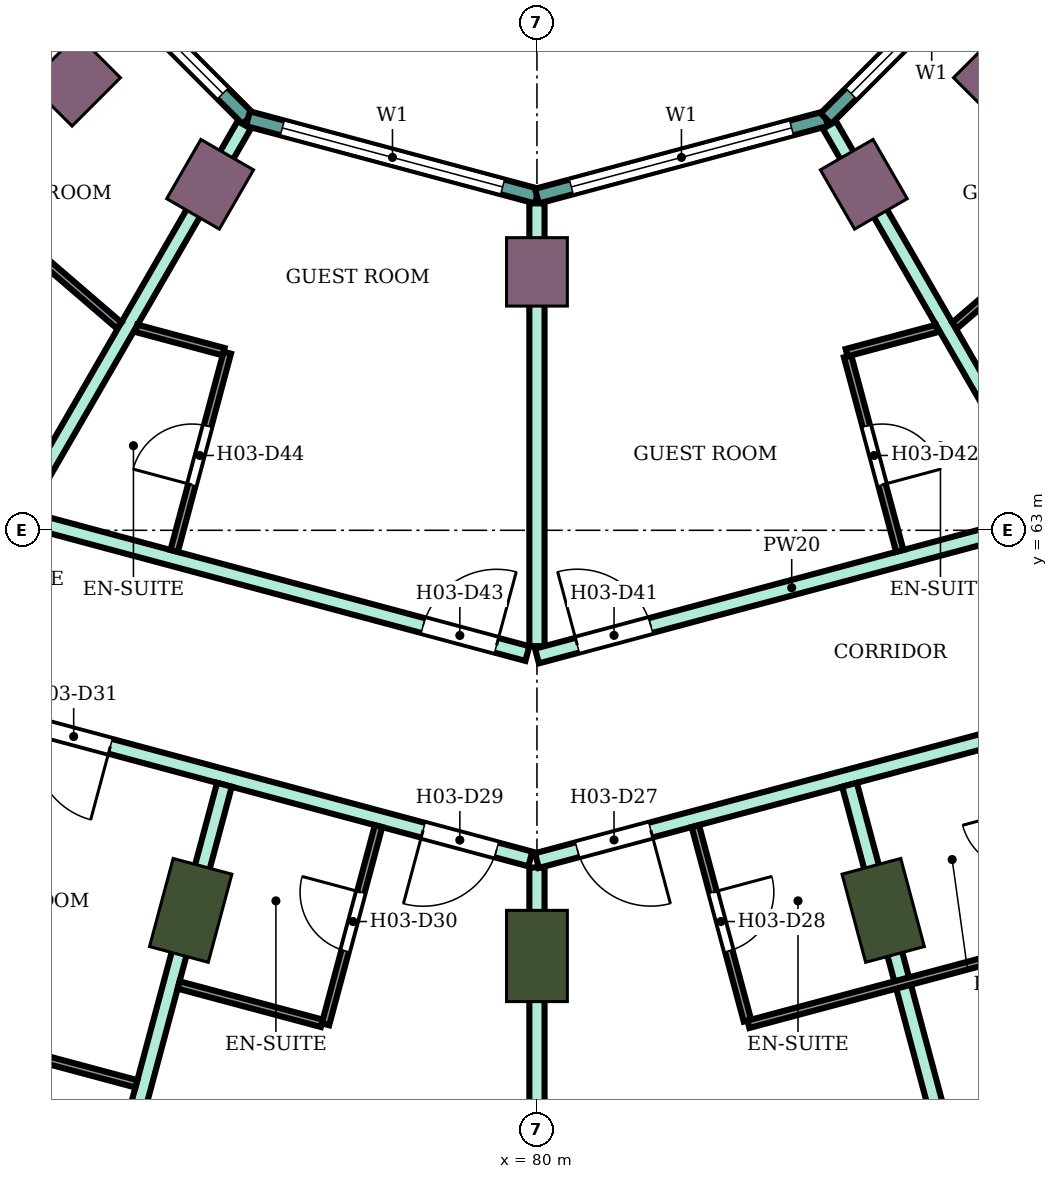
"""IFC4 building model, lengths in metres.
Left out: names, types, materials, properties, quantities, classifications, styles, units other than length and angle.
Written with IfcOpenShell. Run it as: python <this file> out.ifc"""

import sys

from ifc_helpers import new_model, si_unit, direction, frame, frame_2d, origin, origin_2d, place, context, subcontext, project, spatial, rectangle, extrude, element, fill, save


model = new_model("IFC4")
c1 = context("Model", 3, precision=1e-05, world=origin(), true_north=direction((0.0, 1.0)))
c2 = subcontext(c1, "Body", "Model", "MODEL_VIEW")
j1 = project(units=[si_unit("LENGTHUNIT", "METRE"), si_unit("PLANEANGLEUNIT", "RADIAN")], contexts=[c1])
p1 = place(None, origin())
s1 = spatial("IfcSite", under=j1, at=p1, CompositionType="ELEMENT")
p2 = place(p1, origin())
s2 = spatial("IfcBuilding", under=s1, at=p2, CompositionType="ELEMENT")
p3 = place(p2, frame((0.0, 0.0, 59.2)))
s3 = spatial("IfcBuildingStorey", under=s2, at=p3, CompositionType="ELEMENT", Elevation=59.2)
for number, where, z_axis, x_axis in (
    (1, (75.445, 58.0, 0.0), (0.0, 0.0, 1.0), (-0.259, -0.966, 0.0)),
    (2, (80.0, 57.4, 0.0), (0.0, 0.0, 1.0), (0.0, -1.0, 0.0)),
    (3, (84.555, 58.0, 0.0), (0.0, 0.0, 1.0), (0.259, -0.966, 0.0)),
):
    element("IfcColumn", number, at=place(p3, frame(where, z_axis=z_axis, x_axis=x_axis)), inside=s3, PredefinedType="COLUMN", context=c2, shape_type="SweptSolid", body=[
        extrude(rectangle(XDim=1.2, YDim=0.8, at=origin_2d()), origin(), (0.0, 0.0, 1.0), 3.8),
    ])
for number, where, z_axis, x_axis in (
    (4, (73.919, 68.919, 0.0), (0.0, 0.0, 1.0), (-0.707, -0.707, 0.0)),
    (5, (75.7, 67.552, 0.0), (0.0, 0.0, 1.0), (-0.5, -0.866, 0.0)),
    (6, (80.0, 66.4, 0.0), (0.0, 0.0, 1.0), (0.0, -1.0, 0.0)),
    (7, (84.3, 67.552, 0.0), (0.0, 0.0, 1.0), (0.5, -0.866, 0.0)),
    (8, (86.081, 68.919, 0.0), (0.0, 0.0, 1.0), (0.707, -0.707, 0.0)),
):
    element("IfcColumn", number, at=place(p3, frame(where, z_axis=z_axis, x_axis=x_axis)), inside=s3, PredefinedType="COLUMN", context=c2, shape_type="SweptSolid", body=[
        extrude(rectangle(XDim=0.9, YDim=0.8, at=origin_2d()), origin(), (0.0, 0.0, 1.0), 3.8),
    ])
p4 = place(p3, frame((73.415, 71.198, 0.0), z_axis=(0.0, 0.0, 1.0), x_axis=(0.707106781187, -0.707106781187, 0.0)))
e9 = element("IfcWall", 9, at=p4, inside=s3, PredefinedType="NOTDEFINED", context=c2, shape_type="SweptSolid", body=[
    extrude(rectangle(XDim=3.936, YDim=0.2, at=frame_2d((1.968, 0.0))), origin(), (0.0, 0.0, 1.0), 3.8),
])
p5 = place(p4, frame((0.468, 0.0, 0.9)))
e10 = element("IfcOpeningElement", 10, at=p5, cuts=e9, PredefinedType="OPENING", context=c2, shape_type="SweptSolid", body=[
    extrude(rectangle(XDim=3.0, YDim=2.3, at=frame_2d((1.5, 1.15))), frame((0.0, 0.11, 0.0), z_axis=(0.0, -1.0, 0.0), x_axis=(1.0, 0.0, 0.0)), (0.0, 0.0, 1.0), 0.22),
])
p6 = place(p3, frame((76.198, 68.415, 0.0), z_axis=(0.0, 0.0, 1.0), x_axis=(0.965933654434, -0.258789828301, 0.0)))
e11 = element("IfcWall", 11, at=p6, inside=s3, PredefinedType="NOTDEFINED", context=c2, shape_type="SweptSolid", body=[
    extrude(rectangle(XDim=3.936, YDim=0.2, at=frame_2d((1.968, 0.0))), origin(), (0.0, 0.0, 1.0), 3.8),
])
p7 = place(p6, frame((0.468, 0.0, 0.9)))
e12 = element("IfcOpeningElement", 12, at=p7, cuts=e11, PredefinedType="OPENING", context=c2, shape_type="SweptSolid", body=[
    extrude(rectangle(XDim=3.0, YDim=2.3, at=frame_2d((1.5, 1.15))), frame((0.0, 0.11, 0.0), z_axis=(0.0, -1.0, 0.0), x_axis=(1.0, 0.0, 0.0)), (0.0, 0.0, 1.0), 0.22),
])
p8 = place(p3, frame((80.0, 67.396, 0.0), z_axis=(0.0, 0.0, 1.0), x_axis=(0.965933654434, 0.258789828301, 0.0)))
e13 = element("IfcWall", 13, at=p8, inside=s3, PredefinedType="NOTDEFINED", context=c2, shape_type="SweptSolid", body=[
    extrude(rectangle(XDim=3.936, YDim=0.2, at=frame_2d((1.968, 0.0))), origin(), (0.0, 0.0, 1.0), 3.8),
])
p9 = place(p8, frame((0.468, 0.0, 0.9)))
e14 = element("IfcOpeningElement", 14, at=p9, cuts=e13, PredefinedType="OPENING", context=c2, shape_type="SweptSolid", body=[
    extrude(rectangle(XDim=3.0, YDim=2.3, at=frame_2d((1.5, 1.15))), frame((0.0, 0.11, 0.0), z_axis=(0.0, -1.0, 0.0), x_axis=(1.0, 0.0, 0.0)), (0.0, 0.0, 1.0), 0.22),
])
p10 = place(p3, frame((83.802, 68.415, 0.0), z_axis=(0.0, 0.0, 1.0), x_axis=(0.707106781187, 0.707106781187, 0.0)))
e15 = element("IfcWall", 15, at=p10, inside=s3, PredefinedType="NOTDEFINED", context=c2, shape_type="SweptSolid", body=[
    extrude(rectangle(XDim=3.936, YDim=0.2, at=frame_2d((1.968, 0.0))), origin(), (0.0, 0.0, 1.0), 3.8),
])
p11 = place(p10, frame((0.468, 0.0, 0.9)))
e16 = element("IfcOpeningElement", 16, at=p11, cuts=e15, PredefinedType="OPENING", context=c2, shape_type="SweptSolid", body=[
    extrude(rectangle(XDim=3.0, YDim=2.3, at=frame_2d((1.5, 1.15))), frame((0.0, 0.11, 0.0), z_axis=(0.0, -1.0, 0.0), x_axis=(1.0, 0.0, 0.0)), (0.0, 0.0, 1.0), 0.22),
])
p12 = place(p3, frame((71.877, 60.831, 0.0), z_axis=(0.0, 0.0, 1.0), x_axis=(0.965852509869, -0.259092510851, 0.0)))
e17 = element("IfcWall", 17, at=p12, inside=s3, PredefinedType="PARTITIONING", context=c2, shape_type="SweptSolid", body=[
    extrude(rectangle(XDim=8.32, YDim=0.2, at=frame_2d((4.16, 0.0))), origin(), (0.0, 0.0, 1.0), 3.35),
])
p13 = place(p12, frame((6.86, 0.0, 0.0)))
e18 = element("IfcOpeningElement", 18, at=p13, cuts=e17, PredefinedType="OPENING", context=c2, shape_type="SweptSolid", body=[
    extrude(rectangle(XDim=1.0, YDim=2.1, at=frame_2d((0.5, 1.05))), frame((0.0, 0.11, 0.0), z_axis=(0.0, -1.0, 0.0), x_axis=(1.0, 0.0, 0.0)), (0.0, 0.0, 1.0), 0.22),
])
p14 = place(p12, frame((1.6, 0.0, 0.0)))
e19 = element("IfcOpeningElement", 19, at=p14, cuts=e17, PredefinedType="OPENING", context=c2, shape_type="SweptSolid", body=[
    extrude(rectangle(XDim=1.0, YDim=2.1, at=frame_2d((0.5, 1.05))), frame((0.0, 0.11, 0.0), z_axis=(0.0, -1.0, 0.0), x_axis=(1.0, 0.0, 0.0)), (0.0, 0.0, 1.0), 0.22),
])
p15 = place(p3, frame((73.297, 63.143, 0.0), z_axis=(0.0, 0.0, 1.0), x_axis=(0.965859030528, -0.25906820173, 0.0)))
e20 = element("IfcWall", 20, at=p15, inside=s3, PredefinedType="PARTITIONING", context=c2, shape_type="SweptSolid", body=[
    extrude(rectangle(XDim=6.81, YDim=0.2, at=frame_2d((3.405, 0.0))), origin(), (0.0, 0.0, 1.0), 3.35),
])
p16 = place(p15, frame((5.39, 0.0, 0.0)))
e21 = element("IfcOpeningElement", 21, at=p16, cuts=e20, PredefinedType="OPENING", context=c2, shape_type="SweptSolid", body=[
    extrude(rectangle(XDim=1.0, YDim=2.1, at=frame_2d((0.5, 1.05))), frame((0.0, 0.11, 0.0), z_axis=(0.0, -1.0, 0.0), x_axis=(1.0, 0.0, 0.0)), (0.0, 0.0, 1.0), 0.22),
])
p17 = place(p3, frame((73.17, 63.177, 0.0), z_axis=(0.0, 0.0, 1.0), x_axis=(0.500239348149, 0.865887171959, 0.0)))
e22 = element("IfcWall", 22, at=p17, inside=s3, PredefinedType="PARTITIONING", context=c2, shape_type="SweptSolid", body=[
    extrude(rectangle(XDim=5.955, YDim=0.2, at=frame_2d((2.978, 0.0))), origin(), (0.0, 0.0, 1.0), 3.35),
])
p18 = place(p3, frame((73.322, 50.081, 0.0), z_axis=(0.0, 0.0, 1.0), x_axis=(0.25896431718, 0.965886889044, 0.0)))
e23 = element("IfcWall", 23, at=p18, inside=s3, PredefinedType="PARTITIONING", context=c2, shape_type="SweptSolid", body=[
    extrude(rectangle(XDim=9.909, YDim=0.2, at=frame_2d((4.955, 0.0))), origin(), (0.0, 0.0, 1.0), 3.35),
])
p19 = place(p3, frame((80.0, 51.8, 0.0), z_axis=(0.0, 0.0, 1.0), x_axis=(0.0, 1.0, 0.0)))
e24 = element("IfcWall", 24, at=p19, inside=s3, PredefinedType="PARTITIONING", context=c2, shape_type="SweptSolid", body=[
    extrude(rectangle(XDim=6.764, YDim=0.2, at=frame_2d((3.382, 0.0))), origin(), (0.0, 0.0, 1.0), 3.35),
])
p20 = place(p3, frame((80.0, 58.655, 0.0), z_axis=(0.0, 0.0, 1.0), x_axis=(0.965974635626, 0.258636817424, 0.0)))
e25 = element("IfcWall", 25, at=p20, inside=s3, PredefinedType="PARTITIONING", context=c2, shape_type="SweptSolid", body=[
    extrude(rectangle(XDim=8.36, YDim=0.2, at=frame_2d((4.18, 0.0))), origin(), (0.0, 0.0, 1.0), 3.35),
])
p21 = place(p20, frame((6.86, 0.0, 0.0)))
e26 = element("IfcOpeningElement", 26, at=p21, cuts=e25, PredefinedType="OPENING", context=c2, shape_type="SweptSolid", body=[
    extrude(rectangle(XDim=1.0, YDim=2.1, at=frame_2d((0.5, 1.05))), frame((0.0, 0.11, 0.0), z_axis=(0.0, -1.0, 0.0), x_axis=(1.0, 0.0, 0.0)), (0.0, 0.0, 1.0), 0.22),
])
p22 = place(p20, frame((0.55, 0.0, 0.0)))
e27 = element("IfcOpeningElement", 27, at=p22, cuts=e25, PredefinedType="OPENING", context=c2, shape_type="SweptSolid", body=[
    extrude(rectangle(XDim=1.0, YDim=2.1, at=frame_2d((0.5, 1.05))), frame((0.0, 0.11, 0.0), z_axis=(0.0, -1.0, 0.0), x_axis=(1.0, 0.0, 0.0)), (0.0, 0.0, 1.0), 0.22),
])
p23 = place(p3, frame((80.0, 61.476, 0.0), z_axis=(0.0, 0.0, 1.0), x_axis=(0.0, 1.0, 0.0)))
e28 = element("IfcWall", 28, at=p23, inside=s3, PredefinedType="PARTITIONING", context=c2, shape_type="SweptSolid", body=[
    extrude(rectangle(XDim=5.825, YDim=0.2, at=frame_2d((2.913, 0.0))), origin(), (0.0, 0.0, 1.0), 3.35),
])
p24 = place(p3, frame((80.0, 61.346, 0.0), z_axis=(0.0, 0.0, 1.0), x_axis=(0.965924181808, 0.258825182312, 0.0)))
e29 = element("IfcWall", 29, at=p24, inside=s3, PredefinedType="PARTITIONING", context=c2, shape_type="SweptSolid", body=[
    extrude(rectangle(XDim=6.94, YDim=0.2, at=frame_2d((3.47, 0.0))), origin(), (0.0, 0.0, 1.0), 3.35),
])
p25 = place(p24, frame((0.55, 0.0, 0.0)))
e30 = element("IfcOpeningElement", 30, at=p25, cuts=e29, PredefinedType="OPENING", context=c2, shape_type="SweptSolid", body=[
    extrude(rectangle(XDim=1.0, YDim=2.1, at=frame_2d((0.5, 1.05))), frame((0.0, 0.11, 0.0), z_axis=(0.0, -1.0, 0.0), x_axis=(1.0, 0.0, 0.0)), (0.0, 0.0, 1.0), 0.22),
])
p26 = place(p3, frame((83.848, 68.332, 0.0), z_axis=(0.0, 0.0, 1.0), x_axis=(0.499901724708, -0.866082135617, 0.0)))
e31 = element("IfcWall", 31, at=p26, inside=s3, PredefinedType="PARTITIONING", context=c2, shape_type="SweptSolid", body=[
    extrude(rectangle(XDim=5.855, YDim=0.2, at=frame_2d((2.928, 0.0))), origin(), (0.0, 0.0, 1.0), 3.35),
])
p27 = place(p3, frame((84.112, 59.652, 0.0), z_axis=(0.0, 0.0, 1.0), x_axis=(0.258843225553, -0.965919346832, 0.0)))
e32 = element("IfcWall", 32, at=p27, inside=s3, PredefinedType="PARTITIONING", context=c2, shape_type="SweptSolid", body=[
    extrude(rectangle(XDim=9.909, YDim=0.2, at=frame_2d((4.955, 0.0))), origin(), (0.0, 0.0, 1.0), 3.35),
])
p28 = place(p3, frame((69.76, 57.051, 0.0), z_axis=(0.0, 0.0, 1.0), x_axis=(0.965880475586, -0.258988236958, 0.0)))
e33 = element("IfcWall", 33, at=p28, inside=s3, PredefinedType="PARTITIONING", context=c2, shape_type="SweptSolid", body=[
    extrude(rectangle(XDim=5.146, YDim=0.1, at=frame_2d((2.573, 0.0))), origin(), (0.0, 0.0, 1.0), 3.35),
])
p29 = place(p28, frame((1.128, 0.0, 0.0)))
e34 = element("IfcOpeningElement", 34, at=p29, cuts=e33, PredefinedType="OPENING", context=c2, shape_type="SweptSolid", body=[
    extrude(rectangle(XDim=0.9, YDim=2.1, at=frame_2d((0.45, 1.05))), frame((0.0, 0.06, 0.0), z_axis=(0.0, -1.0, 0.0), x_axis=(1.0, 0.0, 0.0)), (0.0, 0.0, 1.0), 0.12),
])
p30 = place(p3, frame((73.357, 66.681, 0.0), z_axis=(0.0, 0.0, 1.0), x_axis=(0.758263469747, -0.651948242154, 0.0)))
e35 = element("IfcWall", 35, at=p30, inside=s3, PredefinedType="PARTITIONING", context=c2, shape_type="SweptSolid", body=[
    extrude(rectangle(XDim=1.511, YDim=0.1, at=frame_2d((0.755, 0.0))), origin(), (0.0, 0.0, 1.0), 3.35),
])
p31 = place(p3, frame((74.729, 65.657, 0.0), z_axis=(0.0, 0.0, 1.0), x_axis=(0.965948051503, -0.258736085224, 0.0)))
e36 = element("IfcWall", 36, at=p31, inside=s3, PredefinedType="PARTITIONING", context=c2, shape_type="SweptSolid", body=[
    extrude(rectangle(XDim=1.189, YDim=0.1, at=frame_2d((0.594, 0.0))), origin(), (0.0, 0.0, 1.0), 3.35),
])
p32 = place(p3, frame((75.286, 57.018, 0.0), z_axis=(0.0, 0.0, 1.0), x_axis=(0.966003902934, -0.258527483095, 0.0)))
e37 = element("IfcWall", 37, at=p32, inside=s3, PredefinedType="PARTITIONING", context=c2, shape_type="SweptSolid", body=[
    extrude(rectangle(XDim=1.95, YDim=0.1, at=frame_2d((0.975, 0.0))), origin(), (0.0, 0.0, 1.0), 3.35),
])
p33 = place(p3, frame((75.227, 62.729, 0.0), z_axis=(0.0, 0.0, 1.0), x_axis=(0.258945475746, 0.965891940432, 0.0)))
e38 = element("IfcWall", 38, at=p33, inside=s3, PredefinedType="PARTITIONING", context=c2, shape_type="SweptSolid", body=[
    extrude(rectangle(XDim=2.7, YDim=0.1, at=frame_2d((1.35, 0.0))), origin(), (0.0, 0.0, 1.0), 3.35),
])
p34 = place(p33, frame((0.9, 0.0, 0.0)))
e39 = element("IfcOpeningElement", 39, at=p34, cuts=e38, PredefinedType="OPENING", context=c2, shape_type="SweptSolid", body=[
    extrude(rectangle(XDim=0.8, YDim=2.1, at=frame_2d((0.4, 1.05))), frame((0.0, 0.06, 0.0), z_axis=(0.0, -1.0, 0.0), x_axis=(1.0, 0.0, 0.0)), (0.0, 0.0, 1.0), 0.12),
])
p35 = place(p3, frame((77.218, 56.501, 0.0), z_axis=(0.0, 0.0, 1.0), x_axis=(0.258591408257, 0.965986792651, 0.0)))
e40 = element("IfcWall", 40, at=p35, inside=s3, PredefinedType="PARTITIONING", context=c2, shape_type="SweptSolid", body=[
    extrude(rectangle(XDim=2.699, YDim=0.1, at=frame_2d((1.35, 0.0))), origin(), (0.0, 0.0, 1.0), 3.35),
])
p36 = place(p35, frame((1.0, 0.0, 0.0)))
e41 = element("IfcOpeningElement", 41, at=p36, cuts=e40, PredefinedType="OPENING", context=c2, shape_type="SweptSolid", body=[
    extrude(rectangle(XDim=0.8, YDim=2.1, at=frame_2d((0.4, 1.05))), frame((0.0, 0.06, 0.0), z_axis=(0.0, -1.0, 0.0), x_axis=(1.0, 0.0, 0.0)), (0.0, 0.0, 1.0), 0.12),
])
p37 = place(p3, frame((82.084, 59.108, 0.0), z_axis=(0.0, 0.0, 1.0), x_axis=(0.258591746437, -0.965986702121, 0.0)))
e42 = element("IfcWall", 42, at=p37, inside=s3, PredefinedType="PARTITIONING", context=c2, shape_type="SweptSolid", body=[
    extrude(rectangle(XDim=2.649, YDim=0.1, at=frame_2d((1.325, 0.0))), origin(), (0.0, 0.0, 1.0), 3.35),
])
p38 = place(p37, frame((0.9, 0.0, 0.0)))
e43 = element("IfcOpeningElement", 43, at=p38, cuts=e42, PredefinedType="OPENING", context=c2, shape_type="SweptSolid", body=[
    extrude(rectangle(XDim=0.8, YDim=2.1, at=frame_2d((0.4, 1.05))), frame((0.0, 0.06, 0.0), z_axis=(0.0, -1.0, 0.0), x_axis=(1.0, 0.0, 0.0)), (0.0, 0.0, 1.0), 0.12),
])
p39 = place(p3, frame((82.782, 56.501, 0.0), z_axis=(0.0, 0.0, 1.0), x_axis=(0.965999228418, 0.258544949083, 0.0)))
e44 = element("IfcWall", 44, at=p39, inside=s3, PredefinedType="PARTITIONING", context=c2, shape_type="SweptSolid", body=[
    extrude(rectangle(XDim=4.15, YDim=0.1, at=frame_2d((2.075, 0.0))), origin(), (0.0, 0.0, 1.0), 3.35),
])
p40 = place(p3, frame((84.087, 65.289, 0.0), z_axis=(0.0, 0.0, 1.0), x_axis=(0.258929459649, -0.965896234037, 0.0)))
e45 = element("IfcWall", 45, at=p40, inside=s3, PredefinedType="PARTITIONING", context=c2, shape_type="SweptSolid", body=[
    extrude(rectangle(XDim=2.65, YDim=0.1, at=frame_2d((1.325, 0.0))), origin(), (0.0, 0.0, 1.0), 3.35),
])
p41 = place(p40, frame((0.95, 0.0, 0.0)))
e46 = element("IfcOpeningElement", 46, at=p41, cuts=e45, PredefinedType="OPENING", context=c2, shape_type="SweptSolid", body=[
    extrude(rectangle(XDim=0.8, YDim=2.1, at=frame_2d((0.4, 1.05))), frame((0.0, 0.06, 0.0), z_axis=(0.0, -1.0, 0.0), x_axis=(1.0, 0.0, 0.0)), (0.0, 0.0, 1.0), 0.12),
])
p42 = place(p3, frame((84.074, 65.337, 0.0), z_axis=(0.0, 0.0, 1.0), x_axis=(0.965914351064, 0.258861867428, 0.0)))
e47 = element("IfcWall", 47, at=p42, inside=s3, PredefinedType="PARTITIONING", context=c2, shape_type="SweptSolid", body=[
    extrude(rectangle(XDim=1.229, YDim=0.1, at=frame_2d((0.615, 0.0))), origin(), (0.0, 0.0, 1.0), 3.35),
])
p43 = place(p3, frame((85.497, 65.696, 0.0), z_axis=(0.0, 0.0, 1.0), x_axis=(0.75817032582, 0.652056559698, 0.0)))
e48 = element("IfcWall", 48, at=p43, inside=s3, PredefinedType="PARTITIONING", context=c2, shape_type="SweptSolid", body=[
    extrude(rectangle(XDim=1.461, YDim=0.1, at=frame_2d((0.73, 0.0))), origin(), (0.0, 0.0, 1.0), 3.35),
])
p44 = place(p5, origin())
e49 = element("IfcWindow", 49, at=p44, inside=s3, PartitioningType="SINGLE_PANEL", PredefinedType="WINDOW", context=c2, shape_type="SweptSolid", body=[
    extrude(rectangle(XDim=3.0, YDim=2.3, at=frame_2d((1.5, 1.15))), frame((0.0, 0.03, 0.0), z_axis=(0.0, -1.0, 0.0), x_axis=(1.0, 0.0, 0.0)), (0.0, 0.0, 1.0), 0.06),
])
fill(e10, e49)
p45 = place(p7, origin())
e50 = element("IfcWindow", 50, at=p45, inside=s3, PartitioningType="SINGLE_PANEL", PredefinedType="WINDOW", context=c2, shape_type="SweptSolid", body=[
    extrude(rectangle(XDim=3.0, YDim=2.3, at=frame_2d((1.5, 1.15))), frame((0.0, 0.03, 0.0), z_axis=(0.0, -1.0, 0.0), x_axis=(1.0, 0.0, 0.0)), (0.0, 0.0, 1.0), 0.06),
])
fill(e12, e50)
p46 = place(p9, origin())
e51 = element("IfcWindow", 51, at=p46, inside=s3, PartitioningType="SINGLE_PANEL", PredefinedType="WINDOW", context=c2, shape_type="SweptSolid", body=[
    extrude(rectangle(XDim=3.0, YDim=2.3, at=frame_2d((1.5, 1.15))), frame((0.0, 0.03, 0.0), z_axis=(0.0, -1.0, 0.0), x_axis=(1.0, 0.0, 0.0)), (0.0, 0.0, 1.0), 0.06),
])
fill(e14, e51)
p47 = place(p11, origin())
e52 = element("IfcWindow", 52, at=p47, inside=s3, PartitioningType="SINGLE_PANEL", PredefinedType="WINDOW", context=c2, shape_type="SweptSolid", body=[
    extrude(rectangle(XDim=3.0, YDim=2.3, at=frame_2d((1.5, 1.15))), frame((0.0, 0.03, 0.0), z_axis=(0.0, -1.0, 0.0), x_axis=(1.0, 0.0, 0.0)), (0.0, 0.0, 1.0), 0.06),
])
fill(e16, e52)
p48 = place(p22, frame((1.0, 0.0, 0.0), z_axis=(0.0, 0.0, 1.0), x_axis=(-1.0, 0.0, 0.0)))
e53 = element("IfcDoor", 53, at=p48, inside=s3, OperationType="SINGLE_SWING_LEFT", PredefinedType="DOOR", context=c2, shape_type="SweptSolid", body=[
    extrude(rectangle(XDim=1.0, YDim=2.1, at=frame_2d((0.5, 1.05))), frame((0.0, 0.025, 0.0), z_axis=(0.0, -1.0, 0.0), x_axis=(1.0, 0.0, 0.0)), (0.0, 0.0, 1.0), 0.05),
])
fill(e27, e53)
p49 = place(p38, origin())
e54 = element("IfcDoor", 54, at=p49, inside=s3, OperationType="SINGLE_SWING_LEFT", PredefinedType="DOOR", context=c2, shape_type="SweptSolid", body=[
    extrude(rectangle(XDim=0.8, YDim=2.1, at=frame_2d((0.4, 1.05))), frame((0.0, 0.025, 0.0), z_axis=(0.0, -1.0, 0.0), x_axis=(1.0, 0.0, 0.0)), (0.0, 0.0, 1.0), 0.05),
])
fill(e43, e54)
p50 = place(p13, frame((1.0, 0.0, 0.0), z_axis=(0.0, 0.0, 1.0), x_axis=(-1.0, 0.0, 0.0)))
e55 = element("IfcDoor", 55, at=p50, inside=s3, OperationType="SINGLE_SWING_RIGHT", PredefinedType="DOOR", context=c2, shape_type="SweptSolid", body=[
    extrude(rectangle(XDim=1.0, YDim=2.1, at=frame_2d((0.5, 1.05))), frame((0.0, 0.025, 0.0), z_axis=(0.0, -1.0, 0.0), x_axis=(1.0, 0.0, 0.0)), (0.0, 0.0, 1.0), 0.05),
])
fill(e18, e55)
p51 = place(p36, origin())
e56 = element("IfcDoor", 56, at=p51, inside=s3, OperationType="SINGLE_SWING_RIGHT", PredefinedType="DOOR", context=c2, shape_type="SweptSolid", body=[
    extrude(rectangle(XDim=0.8, YDim=2.1, at=frame_2d((0.4, 1.05))), frame((0.0, 0.025, 0.0), z_axis=(0.0, -1.0, 0.0), x_axis=(1.0, 0.0, 0.0)), (0.0, 0.0, 1.0), 0.05),
])
fill(e41, e56)
p52 = place(p14, frame((1.0, 0.0, 0.0), z_axis=(0.0, 0.0, 1.0), x_axis=(-1.0, 0.0, 0.0)))
e57 = element("IfcDoor", 57, at=p52, inside=s3, OperationType="SINGLE_SWING_LEFT", PredefinedType="DOOR", context=c2, shape_type="SweptSolid", body=[
    extrude(rectangle(XDim=1.0, YDim=2.1, at=frame_2d((0.5, 1.05))), frame((0.0, 0.025, 0.0), z_axis=(0.0, -1.0, 0.0), x_axis=(1.0, 0.0, 0.0)), (0.0, 0.0, 1.0), 0.05),
])
fill(e19, e57)
p53 = place(p25, origin())
e58 = element("IfcDoor", 58, at=p53, inside=s3, OperationType="SINGLE_SWING_LEFT", PredefinedType="DOOR", context=c2, shape_type="SweptSolid", body=[
    extrude(rectangle(XDim=1.0, YDim=2.1, at=frame_2d((0.5, 1.05))), frame((0.0, 0.025, 0.0), z_axis=(0.0, -1.0, 0.0), x_axis=(1.0, 0.0, 0.0)), (0.0, 0.0, 1.0), 0.05),
])
fill(e30, e58)
p54 = place(p41, origin())
e59 = element("IfcDoor", 59, at=p54, inside=s3, OperationType="SINGLE_SWING_RIGHT", PredefinedType="DOOR", context=c2, shape_type="SweptSolid", body=[
    extrude(rectangle(XDim=0.8, YDim=2.1, at=frame_2d((0.4, 1.05))), frame((0.0, 0.025, 0.0), z_axis=(0.0, -1.0, 0.0), x_axis=(1.0, 0.0, 0.0)), (0.0, 0.0, 1.0), 0.05),
])
fill(e46, e59)
p55 = place(p16, origin())
e60 = element("IfcDoor", 60, at=p55, inside=s3, OperationType="SINGLE_SWING_RIGHT", PredefinedType="DOOR", context=c2, shape_type="SweptSolid", body=[
    extrude(rectangle(XDim=1.0, YDim=2.1, at=frame_2d((0.5, 1.05))), frame((0.0, 0.025, 0.0), z_axis=(0.0, -1.0, 0.0), x_axis=(1.0, 0.0, 0.0)), (0.0, 0.0, 1.0), 0.05),
])
fill(e21, e60)
p56 = place(p34, origin())
e61 = element("IfcDoor", 61, at=p56, inside=s3, OperationType="SINGLE_SWING_LEFT", PredefinedType="DOOR", context=c2, shape_type="SweptSolid", body=[
    extrude(rectangle(XDim=0.8, YDim=2.1, at=frame_2d((0.4, 1.05))), frame((0.0, 0.025, 0.0), z_axis=(0.0, -1.0, 0.0), x_axis=(1.0, 0.0, 0.0)), (0.0, 0.0, 1.0), 0.05),
])
fill(e39, e61)
save(model, sys.argv[1])
